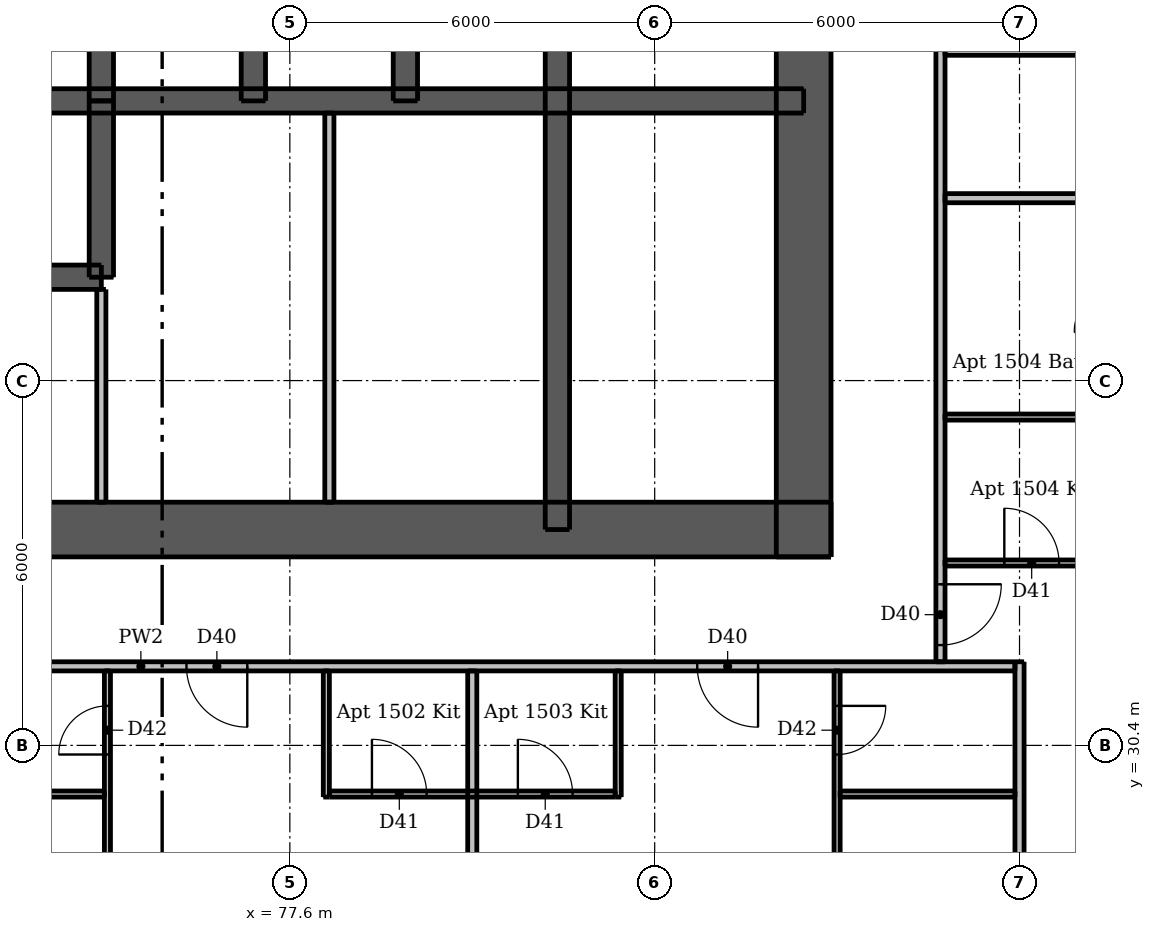
"""IFC4 building model, lengths in metres.
Left out: names, types, materials, properties, quantities, classifications, styles, units other than length and angle.
Written with IfcOpenShell. Run it as: python <this file> out.ifc"""

import sys

from ifc_helpers import new_model, si_unit, direction, frame, frame_2d, origin, place, context, subcontext, project, spatial, rectangle, extrude, element, fill, save


model = new_model("IFC4")
c1 = context("Model", 3, precision=1e-05, world=origin(), true_north=direction((0.0, 1.0)))
c2 = subcontext(c1, "Body", "Model", "MODEL_VIEW")
j1 = project(units=[si_unit("LENGTHUNIT", "METRE"), si_unit("PLANEANGLEUNIT", "RADIAN")], contexts=[c1])
p1 = place(None, origin())
s1 = spatial("IfcSite", under=j1, at=p1, CompositionType="ELEMENT")
p2 = place(p1, origin())
s2 = spatial("IfcBuilding", under=s1, at=p2, CompositionType="ELEMENT")
p3 = place(p2, frame((0.0, 0.0, 56.5)))
s3 = spatial("IfcBuildingStorey", under=s2, at=p3, CompositionType="ELEMENT", Elevation=56.5)
p4 = place(p3, frame((62.5, 33.95, 0.0), z_axis=(0.0, 0.0, 1.0), x_axis=(1.0, 0.0, 0.0)))
e1 = element("IfcWall", 1, at=p4, inside=s3, PredefinedType="SHEAR", context=c2, shape_type="SweptSolid", body=[
    extrude(rectangle(XDim=24.0, YDim=0.9, at=frame_2d((12.0, 0.0))), origin(), (0.0, 0.0, 1.0), 3.05),
])
p5 = place(p4, frame((2.05, 0.0, 0.0)))
e2 = element("IfcOpeningElement", 2, at=p5, cuts=e1, PredefinedType="OPENING", context=c2, shape_type="SweptSolid", body=[
    extrude(rectangle(XDim=1.1, YDim=2.1, at=frame_2d((0.55, 1.05))), frame((0.0, 0.46, 0.0), z_axis=(0.0, -1.0, 0.0), x_axis=(1.0, 0.0, 0.0)), (0.0, 0.0, 1.0), 0.92),
])
p6 = place(p4, frame((20.85, 0.0, 0.0)))
e3 = element("IfcOpeningElement", 3, at=p6, cuts=e1, PredefinedType="OPENING", context=c2, shape_type="SweptSolid", body=[
    extrude(rectangle(XDim=1.1, YDim=2.1, at=frame_2d((0.55, 1.05))), frame((0.0, 0.46, 0.0), z_axis=(0.0, -1.0, 0.0), x_axis=(1.0, 0.0, 0.0)), (0.0, 0.0, 1.0), 0.92),
])
p7 = place(p4, frame((8.0, 0.0, 0.0)))
e4 = element("IfcOpeningElement", 4, at=p7, cuts=e1, PredefinedType="OPENING", context=c2, shape_type="SweptSolid", body=[
    extrude(rectangle(XDim=1.1, YDim=2.1, at=frame_2d((0.55, 1.05))), frame((0.0, 0.46, 0.0), z_axis=(0.0, -1.0, 0.0), x_axis=(1.0, 0.0, 0.0)), (0.0, 0.0, 1.0), 0.92),
])
p8 = place(p4, frame((13.525, 0.0, 0.0)))
e5 = element("IfcOpeningElement", 5, at=p8, cuts=e1, PredefinedType="OPENING", context=c2, shape_type="SweptSolid", body=[
    extrude(rectangle(XDim=0.9, YDim=2.1, at=frame_2d((0.45, 1.05))), frame((0.0, 0.46, 0.0), z_axis=(0.0, -1.0, 0.0), x_axis=(1.0, 0.0, 0.0)), (0.0, 0.0, 1.0), 0.92),
])
p9 = place(p4, frame((17.075, 0.0, 0.0)))
e6 = element("IfcOpeningElement", 6, at=p9, cuts=e1, PredefinedType="OPENING", context=c2, shape_type="SweptSolid", body=[
    extrude(rectangle(XDim=0.9, YDim=2.1, at=frame_2d((0.45, 1.05))), frame((0.0, 0.46, 0.0), z_axis=(0.0, -1.0, 0.0), x_axis=(1.0, 0.0, 0.0)), (0.0, 0.0, 1.0), 0.92),
])
p10 = place(p3, frame((86.05, 33.5, 0.0), z_axis=(0.0, 0.0, 1.0), x_axis=(0.0, 1.0, 0.0)))
e7 = element("IfcWall", 7, at=p10, inside=s3, PredefinedType="SHEAR", context=c2, shape_type="SweptSolid", body=[
    extrude(rectangle(XDim=24.0, YDim=0.9, at=frame_2d((12.0, 0.0))), origin(), (0.0, 0.0, 1.0), 3.05),
])
p11 = place(p10, frame((11.2, 0.0, 0.0)))
e8 = element("IfcOpeningElement", 8, at=p11, cuts=e7, PredefinedType="OPENING", context=c2, shape_type="SweptSolid", body=[
    extrude(rectangle(XDim=1.6, YDim=2.1, at=frame_2d((0.8, 1.05))), frame((0.0, 0.46, 0.0), z_axis=(0.0, -1.0, 0.0), x_axis=(1.0, 0.0, 0.0)), (0.0, 0.0, 1.0), 0.92),
])
p12 = place(p3, frame((62.95, 41.0, 0.0), z_axis=(0.0, 0.0, 1.0), x_axis=(1.0, 0.0, 0.0)))
e9 = element("IfcWall", 9, at=p12, inside=s3, PredefinedType="SHEAR", context=c2, shape_type="SweptSolid", body=[
    extrude(rectangle(XDim=23.1, YDim=0.4, at=frame_2d((11.55, 0.0))), origin(), (0.0, 0.0, 1.0), 3.05),
])
p13 = place(p3, frame((82.0, 33.95, 0.0), z_axis=(0.0, 0.0, 1.0), x_axis=(0.0, 1.0, 0.0)))
e10 = element("IfcWall", 10, at=p13, inside=s3, PredefinedType="SHEAR", context=c2, shape_type="SweptSolid", body=[
    extrude(rectangle(XDim=9.95, YDim=0.4, at=frame_2d((4.975, 0.0))), origin(), (0.0, 0.0, 1.0), 3.05),
])
for number, where, z_axis, x_axis in (
    (11, (74.5, 41.0, 0.0), (0.0, 0.0, 1.0), (0.0, 1.0, 0.0)),
    (12, (77.0, 41.0, 0.0), (0.0, 0.0, 1.0), (0.0, 1.0, 0.0)),
    (13, (79.5, 41.0, 0.0), (0.0, 0.0, 1.0), (0.0, 1.0, 0.0)),
):
    element("IfcWall", number, at=place(p3, frame(where, z_axis=z_axis, x_axis=x_axis)), inside=s3, PredefinedType="SHEAR", context=c2, shape_type="SweptSolid", body=[
        extrude(rectangle(XDim=2.9, YDim=0.4, at=frame_2d((1.45, 0.0))), origin(), (0.0, 0.0, 1.0), 3.05),
    ])
p14 = place(p3, frame((67.0, 38.1, 0.0), z_axis=(0.0, 0.0, 1.0), x_axis=(1.0, 0.0, 0.0)))
e14 = element("IfcWall", 14, at=p14, inside=s3, PredefinedType="SHEAR", context=c2, shape_type="SweptSolid", body=[
    extrude(rectangle(XDim=7.5, YDim=0.4, at=frame_2d((3.75, 0.0))), origin(), (0.0, 0.0, 1.0), 3.05),
])
p15 = place(p14, frame((0.7, 0.0, 0.0)))
e15 = element("IfcOpeningElement", 15, at=p15, cuts=e14, PredefinedType="OPENING", context=c2, shape_type="SweptSolid", body=[
    extrude(rectangle(XDim=1.1, YDim=2.1, at=frame_2d((0.55, 1.05))), frame((0.0, 0.21, 0.0), z_axis=(0.0, -1.0, 0.0), x_axis=(1.0, 0.0, 0.0)), (0.0, 0.0, 1.0), 0.42),
])
p16 = place(p14, frame((3.2, 0.0, 0.0)))
e16 = element("IfcOpeningElement", 16, at=p16, cuts=e14, PredefinedType="OPENING", context=c2, shape_type="SweptSolid", body=[
    extrude(rectangle(XDim=1.1, YDim=2.1, at=frame_2d((0.55, 1.05))), frame((0.0, 0.21, 0.0), z_axis=(0.0, -1.0, 0.0), x_axis=(1.0, 0.0, 0.0)), (0.0, 0.0, 1.0), 0.42),
])
p17 = place(p14, frame((5.65, 0.0, 0.0)))
e17 = element("IfcOpeningElement", 17, at=p17, cuts=e14, PredefinedType="OPENING", context=c2, shape_type="SweptSolid", body=[
    extrude(rectangle(XDim=1.2, YDim=2.1, at=frame_2d((0.6, 1.05))), frame((0.0, 0.21, 0.0), z_axis=(0.0, -1.0, 0.0), x_axis=(1.0, 0.0, 0.0)), (0.0, 0.0, 1.0), 0.42),
])
p18 = place(p3, frame((74.5, 38.1, 0.0), z_axis=(0.0, 0.0, 1.0), x_axis=(0.0, 1.0, 0.0)))
e18 = element("IfcWall", 18, at=p18, inside=s3, PredefinedType="SHEAR", context=c2, shape_type="SweptSolid", body=[
    extrude(rectangle(XDim=2.9, YDim=0.4, at=frame_2d((1.45, 0.0))), origin(), (0.0, 0.0, 1.0), 3.05),
])
p19 = place(p3, frame((74.5, 34.4, 0.0), z_axis=(0.0, 0.0, 1.0), x_axis=(0.0, 1.0, 0.0)))
e19 = element("IfcWall", 19, at=p19, inside=s3, PredefinedType="PLUMBINGWALL", context=c2, shape_type="SweptSolid", body=[
    extrude(rectangle(XDim=3.5, YDim=0.15, at=frame_2d((1.75, 0.0))), origin(), (0.0, 0.0, 1.0), 3.05),
])
p20 = place(p3, frame((78.25, 34.4, 0.0), z_axis=(0.0, 0.0, 1.0), x_axis=(0.0, 1.0, 0.0)))
e20 = element("IfcWall", 20, at=p20, inside=s3, PredefinedType="PLUMBINGWALL", context=c2, shape_type="SweptSolid", body=[
    extrude(rectangle(XDim=6.4, YDim=0.15, at=frame_2d((3.2, 0.0))), origin(), (0.0, 0.0, 1.0), 3.05),
])
p21 = place(p3, frame((74.6, 26.0, 0.0), z_axis=(0.0, 0.0, 1.0), x_axis=(0.0, 1.0, 0.0)))
e21 = element("IfcWall", 21, at=p21, inside=s3, PredefinedType="PARTITIONING", context=c2, shape_type="SweptSolid", body=[
    extrude(rectangle(XDim=5.625, YDim=0.1, at=frame_2d((2.812, 0.0))), origin(), (0.0, 0.0, 1.0), 3.05),
])
p22 = place(p21, frame((1.35, 0.0, 0.0)))
e22 = element("IfcOpeningElement", 22, at=p22, cuts=e21, PredefinedType="OPENING", context=c2, shape_type="SweptSolid", body=[
    extrude(rectangle(XDim=0.9, YDim=2.1, at=frame_2d((0.45, 1.05))), frame((0.0, 0.06, 0.0), z_axis=(0.0, -1.0, 0.0), x_axis=(1.0, 0.0, 0.0)), (0.0, 0.0, 1.0), 0.12),
])
p23 = place(p21, frame((4.25, 0.0, 0.0)))
e23 = element("IfcOpeningElement", 23, at=p23, cuts=e21, PredefinedType="OPENING", context=c2, shape_type="SweptSolid", body=[
    extrude(rectangle(XDim=0.8, YDim=2.1, at=frame_2d((0.4, 1.05))), frame((0.0, 0.06, 0.0), z_axis=(0.0, -1.0, 0.0), x_axis=(1.0, 0.0, 0.0)), (0.0, 0.0, 1.0), 0.12),
])
for number, where, z_axis, x_axis in (
    (24, (78.2, 29.55, 0.0), (0.0, 0.0, 1.0), (0.0, 1.0, 0.0)),
    (25, (83.0, 29.55, 0.0), (0.0, 0.0, 1.0), (0.0, 1.0, 0.0)),
):
    element("IfcWall", number, at=place(p3, frame(where, z_axis=z_axis, x_axis=x_axis)), inside=s3, PredefinedType="PARTITIONING", context=c2, shape_type="SweptSolid", body=[
        extrude(rectangle(XDim=2.075, YDim=0.1, at=frame_2d((1.038, 0.0))), origin(), (0.0, 0.0, 1.0), 3.05),
    ])
p24 = place(p3, frame((86.6, 31.625, 0.0), z_axis=(0.0, 0.0, 1.0), x_axis=(0.0, -1.0, 0.0)))
e26 = element("IfcWall", 26, at=p24, inside=s3, PredefinedType="PARTITIONING", context=c2, shape_type="SweptSolid", body=[
    extrude(rectangle(XDim=5.625, YDim=0.1, at=frame_2d((2.812, 0.0))), origin(), (0.0, 0.0, 1.0), 3.05),
])
p25 = place(p24, frame((3.375, 0.0, 0.0)))
e27 = element("IfcOpeningElement", 27, at=p25, cuts=e26, PredefinedType="OPENING", context=c2, shape_type="SweptSolid", body=[
    extrude(rectangle(XDim=0.9, YDim=2.1, at=frame_2d((0.45, 1.05))), frame((0.0, 0.06, 0.0), z_axis=(0.0, -1.0, 0.0), x_axis=(1.0, 0.0, 0.0)), (0.0, 0.0, 1.0), 0.12),
])
p26 = place(p24, frame((0.575, 0.0, 0.0)))
e28 = element("IfcOpeningElement", 28, at=p26, cuts=e26, PredefinedType="OPENING", context=c2, shape_type="SweptSolid", body=[
    extrude(rectangle(XDim=0.8, YDim=2.1, at=frame_2d((0.4, 1.05))), frame((0.0, 0.06, 0.0), z_axis=(0.0, -1.0, 0.0), x_axis=(1.0, 0.0, 0.0)), (0.0, 0.0, 1.0), 0.12),
])
p27 = place(p3, frame((88.375, 41.8, 0.0), z_axis=(0.0, 0.0, 1.0), x_axis=(1.0, 0.0, 0.0)))
e29 = element("IfcWall", 29, at=p27, inside=s3, PredefinedType="PARTITIONING", context=c2, shape_type="SweptSolid", body=[
    extrude(rectangle(XDim=2.975, YDim=0.1, at=frame_2d((1.488, 0.0))), origin(), (0.0, 0.0, 1.0), 3.05),
])
p28 = place(p3, frame((88.375, 35.8, 0.0), z_axis=(0.0, 0.0, 1.0), x_axis=(1.0, 0.0, 0.0)))
e30 = element("IfcWall", 30, at=p28, inside=s3, PredefinedType="PARTITIONING", context=c2, shape_type="SweptSolid", body=[
    extrude(rectangle(XDim=2.875, YDim=0.1, at=frame_2d((1.438, 0.0))), origin(), (0.0, 0.0, 1.0), 3.05),
])
p29 = place(p3, frame((88.375, 33.4, 0.0), z_axis=(0.0, 0.0, 1.0), x_axis=(1.0, 0.0, 0.0)))
e31 = element("IfcWall", 31, at=p29, inside=s3, PredefinedType="PARTITIONING", context=c2, shape_type="SweptSolid", body=[
    extrude(rectangle(XDim=5.625, YDim=0.1, at=frame_2d((2.812, 0.0))), origin(), (0.0, 0.0, 1.0), 3.05),
])
p30 = place(p29, frame((0.975, 0.0, 0.0)))
e32 = element("IfcOpeningElement", 32, at=p30, cuts=e31, PredefinedType="OPENING", context=c2, shape_type="SweptSolid", body=[
    extrude(rectangle(XDim=0.9, YDim=2.1, at=frame_2d((0.45, 1.05))), frame((0.0, 0.06, 0.0), z_axis=(0.0, -1.0, 0.0), x_axis=(1.0, 0.0, 0.0)), (0.0, 0.0, 1.0), 0.12),
])
p31 = place(p29, frame((3.825, 0.0, 0.0)))
e33 = element("IfcOpeningElement", 33, at=p31, cuts=e31, PredefinedType="OPENING", context=c2, shape_type="SweptSolid", body=[
    extrude(rectangle(XDim=0.9, YDim=2.1, at=frame_2d((0.45, 1.05))), frame((0.0, 0.06, 0.0), z_axis=(0.0, -1.0, 0.0), x_axis=(1.0, 0.0, 0.0)), (0.0, 0.0, 1.0), 0.12),
])
p32 = place(p3, frame((71.05, 29.6, 0.0), z_axis=(0.0, 0.0, 1.0), x_axis=(1.0, 0.0, 0.0)))
e34 = element("IfcWall", 34, at=p32, inside=s3, PredefinedType="PARTITIONING", context=c2, shape_type="SweptSolid", body=[
    extrude(rectangle(XDim=3.5, YDim=0.1, at=frame_2d((1.75, 0.0))), origin(), (0.0, 0.0, 1.0), 3.05),
])
p33 = place(p3, frame((78.25, 29.6, 0.0), z_axis=(0.0, 0.0, 1.0), x_axis=(1.0, 0.0, 0.0)))
e35 = element("IfcWall", 35, at=p33, inside=s3, PredefinedType="PARTITIONING", context=c2, shape_type="SweptSolid", body=[
    extrude(rectangle(XDim=4.7, YDim=0.1, at=frame_2d((2.35, 0.0))), origin(), (0.0, 0.0, 1.0), 3.05),
])
p34 = place(p33, frame((0.7, 0.0, 0.0)))
e36 = element("IfcOpeningElement", 36, at=p34, cuts=e35, PredefinedType="OPENING", context=c2, shape_type="SweptSolid", body=[
    extrude(rectangle(XDim=0.9, YDim=2.1, at=frame_2d((0.45, 1.05))), frame((0.0, 0.06, 0.0), z_axis=(0.0, -1.0, 0.0), x_axis=(1.0, 0.0, 0.0)), (0.0, 0.0, 1.0), 0.12),
])
p35 = place(p33, frame((3.1, 0.0, 0.0)))
e37 = element("IfcOpeningElement", 37, at=p35, cuts=e35, PredefinedType="OPENING", context=c2, shape_type="SweptSolid", body=[
    extrude(rectangle(XDim=0.9, YDim=2.1, at=frame_2d((0.45, 1.05))), frame((0.0, 0.06, 0.0), z_axis=(0.0, -1.0, 0.0), x_axis=(1.0, 0.0, 0.0)), (0.0, 0.0, 1.0), 0.12),
])
p36 = place(p3, frame((86.65, 29.6, 0.0), z_axis=(0.0, 0.0, 1.0), x_axis=(1.0, 0.0, 0.0)))
e38 = element("IfcWall", 38, at=p36, inside=s3, PredefinedType="PARTITIONING", context=c2, shape_type="SweptSolid", body=[
    extrude(rectangle(XDim=2.875, YDim=0.1, at=frame_2d((1.438, 0.0))), origin(), (0.0, 0.0, 1.0), 3.05),
])
p37 = place(p3, frame((80.6, 26.0, 0.0), z_axis=(0.0, 0.0, 1.0), x_axis=(0.0, 1.0, 0.0)))
e39 = element("IfcWall", 39, at=p37, inside=s3, PredefinedType="PARTITIONING", context=c2, shape_type="SweptSolid", body=[
    extrude(rectangle(XDim=5.625, YDim=0.15, at=frame_2d((2.812, 0.0))), origin(), (0.0, 0.0, 1.0), 3.05),
])
p38 = place(p3, frame((88.3, 60.475, 0.0), z_axis=(0.0, 0.0, 1.0), x_axis=(0.0, -1.0, 0.0)))
e40 = element("IfcWall", 40, at=p38, inside=s3, PredefinedType="PARTITIONING", context=c2, shape_type="SweptSolid", body=[
    extrude(rectangle(XDim=28.7, YDim=0.15, at=frame_2d((14.35, 0.0))), origin(), (0.0, 0.0, 1.0), 3.05),
])
p39 = place(p38, frame((27.425, 0.0, 0.0)))
e41 = element("IfcOpeningElement", 41, at=p39, cuts=e40, PredefinedType="OPENING", context=c2, shape_type="SweptSolid", body=[
    extrude(rectangle(XDim=1.0, YDim=2.1, at=frame_2d((0.5, 1.05))), frame((0.0, 0.085, 0.0), z_axis=(0.0, -1.0, 0.0), x_axis=(1.0, 0.0, 0.0)), (0.0, 0.0, 1.0), 0.17),
])
p40 = place(p38, frame((11.575, 0.0, 0.0)))
e42 = element("IfcOpeningElement", 42, at=p40, cuts=e40, PredefinedType="OPENING", context=c2, shape_type="SweptSolid", body=[
    extrude(rectangle(XDim=1.0, YDim=2.1, at=frame_2d((0.5, 1.05))), frame((0.0, 0.085, 0.0), z_axis=(0.0, -1.0, 0.0), x_axis=(1.0, 0.0, 0.0)), (0.0, 0.0, 1.0), 0.17),
])
p41 = place(p38, frame((2.575, 0.0, 0.0)))
e43 = element("IfcOpeningElement", 43, at=p41, cuts=e40, PredefinedType="OPENING", context=c2, shape_type="SweptSolid", body=[
    extrude(rectangle(XDim=1.0, YDim=2.1, at=frame_2d((0.5, 1.05))), frame((0.0, 0.085, 0.0), z_axis=(0.0, -1.0, 0.0), x_axis=(1.0, 0.0, 0.0)), (0.0, 0.0, 1.0), 0.17),
])
p42 = place(p3, frame((89.6, 26.0, 0.0), z_axis=(0.0, 0.0, 1.0), x_axis=(0.0, 1.0, 0.0)))
e44 = element("IfcWall", 44, at=p42, inside=s3, PredefinedType="PARTITIONING", context=c2, shape_type="SweptSolid", body=[
    extrude(rectangle(XDim=5.775, YDim=0.15, at=frame_2d((2.887, 0.0))), origin(), (0.0, 0.0, 1.0), 2.516),
])
p43 = place(p3, frame((88.375, 39.4, 0.0), z_axis=(0.0, 0.0, 1.0), x_axis=(1.0, 0.0, 0.0)))
e45 = element("IfcWall", 45, at=p43, inside=s3, PredefinedType="PARTITIONING", context=c2, shape_type="SweptSolid", body=[
    extrude(rectangle(XDim=5.625, YDim=0.15, at=frame_2d((2.812, 0.0))), origin(), (0.0, 0.0, 1.0), 3.05),
])
p44 = place(p3, frame((89.525, 31.7, 0.0), z_axis=(0.0, 0.0, 1.0), x_axis=(-1.0, 0.0, 0.0)))
e46 = element("IfcWall", 46, at=p44, inside=s3, PredefinedType="PARTITIONING", context=c2, shape_type="SweptSolid", body=[
    extrude(rectangle(XDim=28.75, YDim=0.15, at=frame_2d((14.375, 0.0))), origin(), (0.0, 0.0, 1.0), 3.05),
])
p45 = place(p44, frame((27.375, 0.0, 0.0)))
e47 = element("IfcOpeningElement", 47, at=p45, cuts=e46, PredefinedType="OPENING", context=c2, shape_type="SweptSolid", body=[
    extrude(rectangle(XDim=1.0, YDim=2.1, at=frame_2d((0.5, 1.05))), frame((0.0, 0.085, 0.0), z_axis=(0.0, -1.0, 0.0), x_axis=(1.0, 0.0, 0.0)), (0.0, 0.0, 1.0), 0.17),
])
p46 = place(p44, frame((12.625, 0.0, 0.0)))
e48 = element("IfcOpeningElement", 48, at=p46, cuts=e46, PredefinedType="OPENING", context=c2, shape_type="SweptSolid", body=[
    extrude(rectangle(XDim=1.0, YDim=2.1, at=frame_2d((0.5, 1.05))), frame((0.0, 0.085, 0.0), z_axis=(0.0, -1.0, 0.0), x_axis=(1.0, 0.0, 0.0)), (0.0, 0.0, 1.0), 0.17),
])
p47 = place(p44, frame((4.225, 0.0, 0.0)))
e49 = element("IfcOpeningElement", 49, at=p47, cuts=e46, PredefinedType="OPENING", context=c2, shape_type="SweptSolid", body=[
    extrude(rectangle(XDim=1.0, YDim=2.1, at=frame_2d((0.5, 1.05))), frame((0.0, 0.085, 0.0), z_axis=(0.0, -1.0, 0.0), x_axis=(1.0, 0.0, 0.0)), (0.0, 0.0, 1.0), 0.17),
])
p48 = place(p6, origin())
e50 = element("IfcDoor", 50, at=p48, inside=s3, OperationType="SINGLE_SWING_RIGHT", PredefinedType="DOOR", context=c2, shape_type="SweptSolid", body=[
    extrude(rectangle(XDim=1.1, YDim=2.1, at=frame_2d((0.55, 1.05))), frame((0.0, 0.438, 0.0), z_axis=(0.0, -1.0, 0.0), x_axis=(1.0, 0.0, 0.0)), (0.0, 0.0, 1.0), 0.05),
])
fill(e3, e50)
p49 = place(p8, origin())
e51 = element("IfcDoor", 51, at=p49, inside=s3, OperationType="SINGLE_SWING_LEFT", PredefinedType="DOOR", context=c2, shape_type="SweptSolid", body=[
    extrude(rectangle(XDim=0.9, YDim=2.1, at=frame_2d((0.45, 1.05))), frame((0.0, 0.438, 0.0), z_axis=(0.0, -1.0, 0.0), x_axis=(1.0, 0.0, 0.0)), (0.0, 0.0, 1.0), 0.05),
])
fill(e5, e51)
p50 = place(p9, origin())
e52 = element("IfcDoor", 52, at=p50, inside=s3, OperationType="SINGLE_SWING_LEFT", PredefinedType="DOOR", context=c2, shape_type="SweptSolid", body=[
    extrude(rectangle(XDim=0.9, YDim=2.1, at=frame_2d((0.45, 1.05))), frame((0.0, 0.438, 0.0), z_axis=(0.0, -1.0, 0.0), x_axis=(1.0, 0.0, 0.0)), (0.0, 0.0, 1.0), 0.05),
])
fill(e6, e52)
p51 = place(p17, origin())
e53 = element("IfcDoor", 53, at=p51, inside=s3, OperationType="DOUBLE_DOOR_SLIDING", PredefinedType="DOOR", context=c2, shape_type="SweptSolid", body=[
    extrude(rectangle(XDim=1.2, YDim=2.1, at=frame_2d((0.6, 1.05))), frame((0.0, 0.025, 0.0), z_axis=(0.0, -1.0, 0.0), x_axis=(1.0, 0.0, 0.0)), (0.0, 0.0, 1.0), 0.05),
])
fill(e17, e53)
p52 = place(p46, origin())
e54 = element("IfcDoor", 54, at=p52, inside=s3, OperationType="SINGLE_SWING_LEFT", PredefinedType="DOOR", context=c2, shape_type="SweptSolid", body=[
    extrude(rectangle(XDim=1.0, YDim=2.1, at=frame_2d((0.5, 1.05))), frame((0.0, 0.025, 0.0), z_axis=(0.0, -1.0, 0.0), x_axis=(1.0, 0.0, 0.0)), (0.0, 0.0, 1.0), 0.05),
])
fill(e48, e54)
p53 = place(p34, origin())
e55 = element("IfcDoor", 55, at=p53, inside=s3, OperationType="SINGLE_SWING_LEFT", PredefinedType="DOOR", context=c2, shape_type="SweptSolid", body=[
    extrude(rectangle(XDim=0.9, YDim=2.1, at=frame_2d((0.45, 1.05))), frame((0.0, 0.025, 0.0), z_axis=(0.0, -1.0, 0.0), x_axis=(1.0, 0.0, 0.0)), (0.0, 0.0, 1.0), 0.05),
])
fill(e36, e55)
p54 = place(p23, origin())
e56 = element("IfcDoor", 56, at=p54, inside=s3, OperationType="SINGLE_SWING_LEFT", PredefinedType="DOOR", context=c2, shape_type="SweptSolid", body=[
    extrude(rectangle(XDim=0.8, YDim=2.1, at=frame_2d((0.4, 1.05))), frame((0.0, 0.025, 0.0), z_axis=(0.0, -1.0, 0.0), x_axis=(1.0, 0.0, 0.0)), (0.0, 0.0, 1.0), 0.05),
])
fill(e23, e56)
p55 = place(p47, origin())
e57 = element("IfcDoor", 57, at=p55, inside=s3, OperationType="SINGLE_SWING_LEFT", PredefinedType="DOOR", context=c2, shape_type="SweptSolid", body=[
    extrude(rectangle(XDim=1.0, YDim=2.1, at=frame_2d((0.5, 1.05))), frame((0.0, 0.025, 0.0), z_axis=(0.0, -1.0, 0.0), x_axis=(1.0, 0.0, 0.0)), (0.0, 0.0, 1.0), 0.05),
])
fill(e49, e57)
p56 = place(p35, origin())
e58 = element("IfcDoor", 58, at=p56, inside=s3, OperationType="SINGLE_SWING_LEFT", PredefinedType="DOOR", context=c2, shape_type="SweptSolid", body=[
    extrude(rectangle(XDim=0.9, YDim=2.1, at=frame_2d((0.45, 1.05))), frame((0.0, 0.025, 0.0), z_axis=(0.0, -1.0, 0.0), x_axis=(1.0, 0.0, 0.0)), (0.0, 0.0, 1.0), 0.05),
])
fill(e37, e58)
p57 = place(p26, origin())
e59 = element("IfcDoor", 59, at=p57, inside=s3, OperationType="SINGLE_SWING_LEFT", PredefinedType="DOOR", context=c2, shape_type="SweptSolid", body=[
    extrude(rectangle(XDim=0.8, YDim=2.1, at=frame_2d((0.4, 1.05))), frame((0.0, 0.025, 0.0), z_axis=(0.0, -1.0, 0.0), x_axis=(1.0, 0.0, 0.0)), (0.0, 0.0, 1.0), 0.05),
])
fill(e28, e59)
p58 = place(p39, origin())
e60 = element("IfcDoor", 60, at=p58, inside=s3, OperationType="SINGLE_SWING_LEFT", PredefinedType="DOOR", context=c2, shape_type="SweptSolid", body=[
    extrude(rectangle(XDim=1.0, YDim=2.1, at=frame_2d((0.5, 1.05))), frame((0.0, 0.025, 0.0), z_axis=(0.0, -1.0, 0.0), x_axis=(1.0, 0.0, 0.0)), (0.0, 0.0, 1.0), 0.05),
])
fill(e41, e60)
p59 = place(p30, origin())
e61 = element("IfcDoor", 61, at=p59, inside=s3, OperationType="SINGLE_SWING_LEFT", PredefinedType="DOOR", context=c2, shape_type="SweptSolid", body=[
    extrude(rectangle(XDim=0.9, YDim=2.1, at=frame_2d((0.45, 1.05))), frame((0.0, 0.025, 0.0), z_axis=(0.0, -1.0, 0.0), x_axis=(1.0, 0.0, 0.0)), (0.0, 0.0, 1.0), 0.05),
])
fill(e32, e61)
save(model, sys.argv[1])
